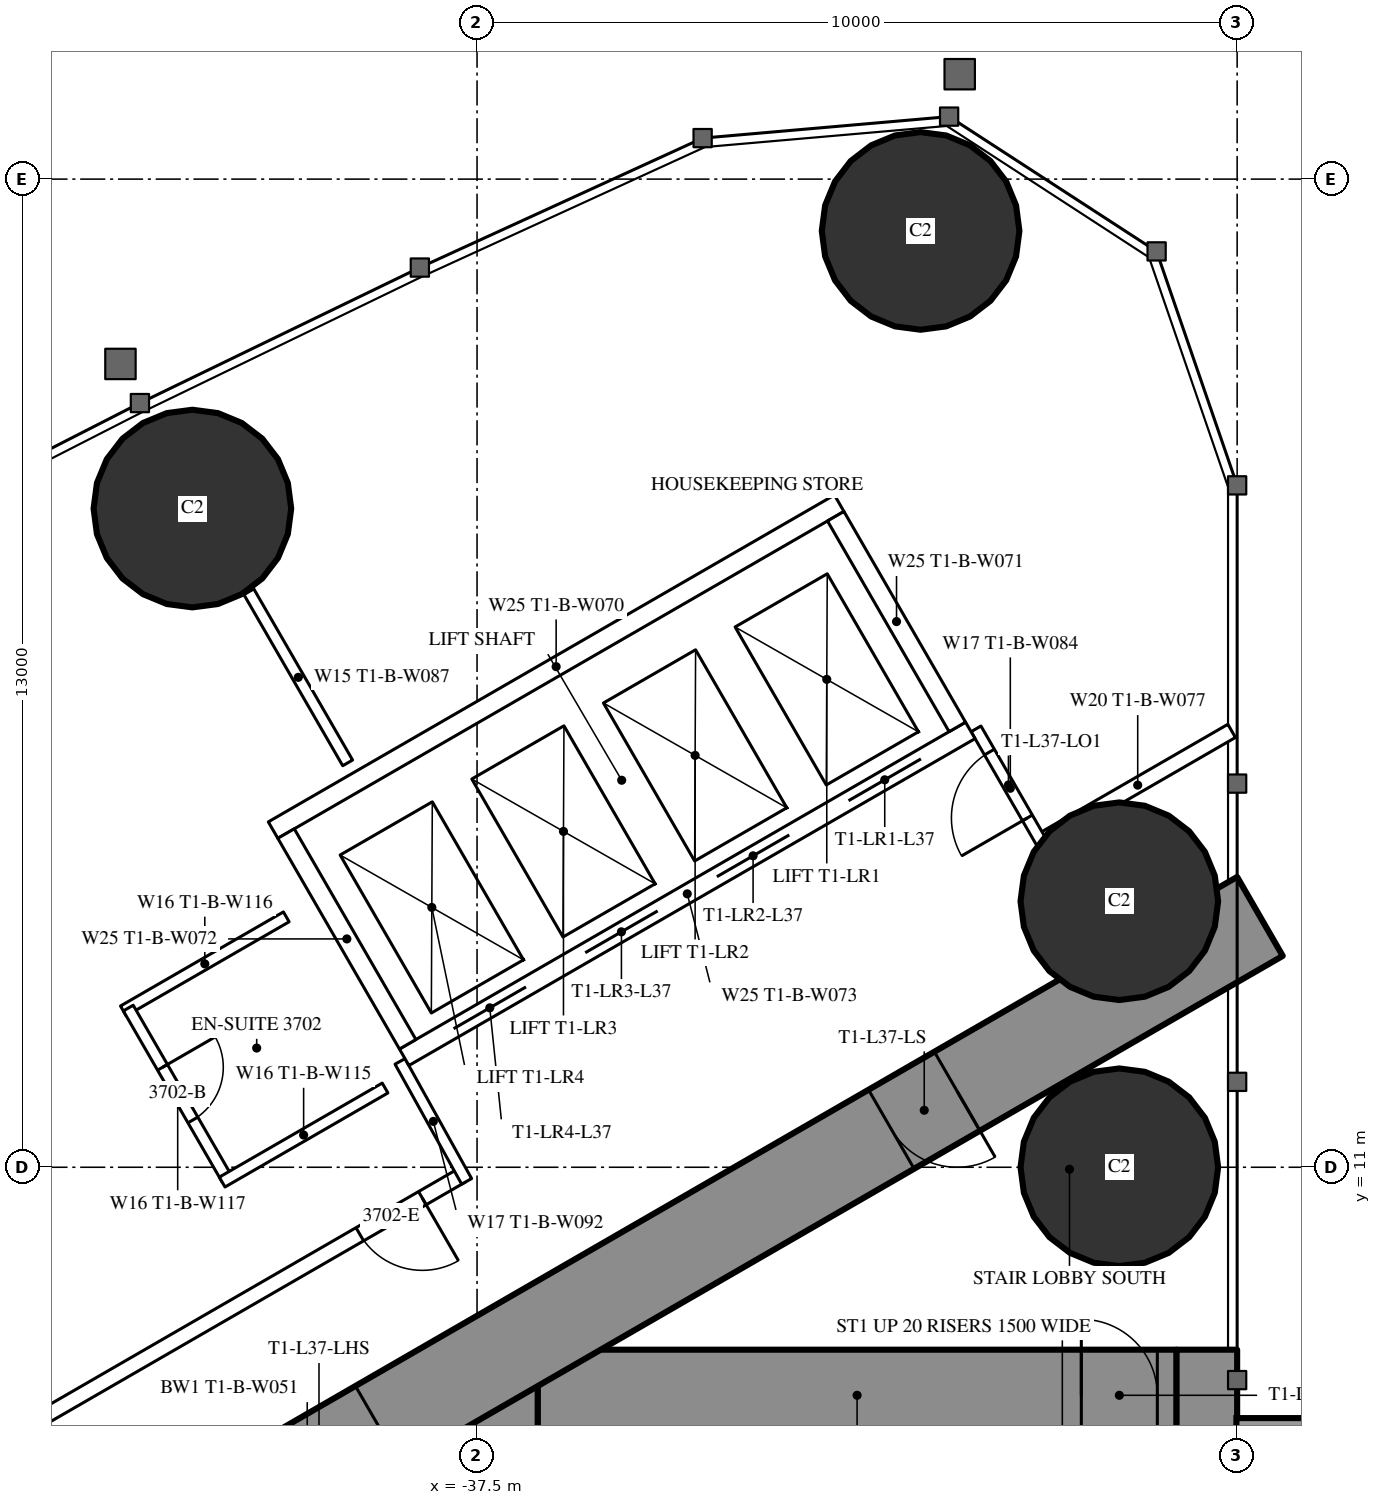
"""IFC4 building model, lengths in metres.
Left out: names, types, materials, properties, quantities, classifications, styles, units other than length and angle.
Written with IfcOpenShell. Run it as: python <this file> out.ifc"""

import sys

from ifc_helpers import new_model, si_unit, direction, frame, frame_2d, origin, origin_2d, place, context, subcontext, project, spatial, rectangle, hollow_circle, extrude, element, fill, save


model = new_model("IFC4")
c1 = context("Model", 3, precision=1e-05, world=origin(), true_north=direction((0.0, 1.0)))
c2 = subcontext(c1, "Body", "Model", "MODEL_VIEW")
j1 = project(units=[si_unit("LENGTHUNIT", "METRE"), si_unit("PLANEANGLEUNIT", "RADIAN")], contexts=[c1])
p1 = place(None, origin())
s1 = spatial("IfcSite", under=j1, at=p1, CompositionType="ELEMENT")
p2 = place(p1, origin())
s2 = spatial("IfcBuilding", under=s1, at=p2, CompositionType="ELEMENT")
p3 = place(p2, frame((0.0, 0.0, 139.6)))
s3 = spatial("IfcBuildingStorey", under=s2, at=p3, CompositionType="ELEMENT", Elevation=139.6)
for number, where, z_axis, x_axis in (
    (1, (-31.665, 23.318, 0.0), (0.0, 0.0, 1.0), (1.0, 0.0, 0.0)),
    (2, (-29.05, 11.0, 0.0), (0.0, 0.0, 1.0), (1.0, 0.0, 0.0)),
    (3, (-29.05, 14.5, 0.0), (0.0, 0.0, 1.0), (1.0, 0.0, 0.0)),
    (4, (-41.245, 19.666, 0.0), (0.0, 0.0, 1.0), (1.0, 0.0, 0.0)),
):
    element("IfcColumn", number, at=place(p3, frame(where, z_axis=z_axis, x_axis=x_axis)), inside=s3, PredefinedType="COLUMN", context=c2, shape_type="SweptSolid", body=[
        extrude(hollow_circle(Radius=1.3, WallThickness=0.1, at=origin_2d()), origin(), (0.0, 0.0, 1.0), 3.5),
    ])
p4 = place(p3, frame((-27.9, 8.6, 0.0), z_axis=(0.0, 0.0, 1.0), x_axis=(0.0, -1.0, 0.0)))
e5 = element("IfcWall", 5, at=p4, inside=s3, PredefinedType="SHEAR", context=c2, shape_type="SweptSolid", body=[
    extrude(rectangle(XDim=17.2, YDim=0.8, at=frame_2d((8.6, 0.0))), origin(), (0.0, 0.0, 1.0), 3.5),
])
p5 = place(p4, frame((2.45, 0.0, 0.6)))
e6 = element("IfcOpeningElement", 6, at=p5, cuts=e5, PredefinedType="OPENING", context=c2, shape_type="SweptSolid", body=[
    extrude(rectangle(XDim=0.6, YDim=2.1, at=frame_2d((0.3, 1.05))), frame((0.0, 0.41, 0.0), z_axis=(0.0, -1.0, 0.0), x_axis=(1.0, 0.0, 0.0)), (0.0, 0.0, 1.0), 0.82),
])
p6 = place(p4, frame((14.15, 0.0, 0.6)))
e7 = element("IfcOpeningElement", 7, at=p6, cuts=e5, PredefinedType="OPENING", context=c2, shape_type="SweptSolid", body=[
    extrude(rectangle(XDim=0.6, YDim=2.1, at=frame_2d((0.3, 1.05))), frame((0.0, 0.41, 0.0), z_axis=(0.0, -1.0, 0.0), x_axis=(1.0, 0.0, 0.0)), (0.0, 0.0, 1.0), 0.82),
])
p7 = place(p3, frame((-37.3, 8.6, 0.0), z_axis=(0.0, 0.0, 1.0), x_axis=(0.0, -1.0, 0.0)))
e8 = element("IfcWall", 8, at=p7, inside=s3, PredefinedType="SHEAR", context=c2, shape_type="SweptSolid", body=[
    extrude(rectangle(XDim=17.2, YDim=1.2, at=frame_2d((8.6, 0.0))), origin(), (0.0, 0.0, 1.0), 3.5),
])
p8 = place(p7, frame((7.7, 0.0, 0.0)))
e9 = element("IfcOpeningElement", 9, at=p8, cuts=e8, PredefinedType="OPENING", context=c2, shape_type="SweptSolid", body=[
    extrude(rectangle(XDim=1.8, YDim=2.2, at=frame_2d((0.9, 1.1))), frame((0.0, 0.61, 0.0), z_axis=(0.0, -1.0, 0.0), x_axis=(1.0, 0.0, 0.0)), (0.0, 0.0, 1.0), 1.22),
])
p9 = place(p3, frame((-28.3, 8.0, 0.0), z_axis=(0.0, 0.0, 1.0), x_axis=(-1.0, 0.0, 0.0)))
e10 = element("IfcWall", 10, at=p9, inside=s3, PredefinedType="SHEAR", context=c2, shape_type="SweptSolid", body=[
    extrude(rectangle(XDim=8.4, YDim=1.2, at=frame_2d((4.2, 0.0))), origin(), (0.0, 0.0, 1.0), 3.5),
])
p10 = place(p9, frame((0.25, 0.0, 0.0)))
e11 = element("IfcOpeningElement", 11, at=p10, cuts=e10, PredefinedType="OPENING", context=c2, shape_type="SweptSolid", body=[
    extrude(rectangle(XDim=1.0, YDim=2.2, at=frame_2d((0.5, 1.1))), frame((0.0, 0.61, 0.0), z_axis=(0.0, -1.0, 0.0), x_axis=(1.0, 0.0, 0.0)), (0.0, 0.0, 1.0), 1.22),
])
p11 = place(p3, frame((-27.2, 14.3, 0.0), z_axis=(0.0, 0.0, 1.0), x_axis=(-0.866026593062, -0.499997940104, 0.0)))
e12 = element("IfcWall", 12, at=p11, inside=s3, PredefinedType="SHEAR", context=c2, shape_type="SweptSolid", body=[
    extrude(rectangle(XDim=28.946, YDim=1.2, at=frame_2d((14.473, 0.0))), origin(), (0.0, 0.0, 1.0), 3.5),
])
p12 = place(p11, frame((4.6, 0.0, 0.0)))
e13 = element("IfcOpeningElement", 13, at=p12, cuts=e12, PredefinedType="OPENING", context=c2, shape_type="SweptSolid", body=[
    extrude(rectangle(XDim=1.0, YDim=2.2, at=frame_2d((0.5, 1.1))), frame((0.0, 0.61, 0.0), z_axis=(0.0, -1.0, 0.0), x_axis=(1.0, 0.0, 0.0)), (0.0, 0.0, 1.0), 1.22),
])
p13 = place(p11, frame((13.395, 0.0, 0.0)))
e14 = element("IfcOpeningElement", 14, at=p13, cuts=e12, PredefinedType="OPENING", context=c2, shape_type="SweptSolid", body=[
    extrude(rectangle(XDim=1.8, YDim=2.2, at=frame_2d((0.9, 1.1))), frame((0.0, 0.61, 0.0), z_axis=(0.0, -1.0, 0.0), x_axis=(1.0, 0.0, 0.0)), (0.0, 0.0, 1.0), 1.22),
])
p14 = place(p3, frame((-39.202, 16.32, 0.0), z_axis=(0.0, 0.0, 1.0), x_axis=(-0.499947391036, 0.866055775454, 0.0)))
e15 = element("IfcWall", 15, at=p14, inside=s3, PredefinedType="PARTITIONING", context=c2, shape_type="SweptSolid", body=[
    extrude(rectangle(XDim=2.599, YDim=0.15, at=frame_2d((1.3, 0.0))), origin(), (0.0, 0.0, 1.0), 3.25),
])
p15 = place(p3, frame((-27.572, 16.741, 0.0), z_axis=(0.0, 0.0, 1.0), x_axis=(-0.866034618596, -0.499984039138, 0.0)))
e16 = element("IfcWall", 16, at=p15, inside=s3, PredefinedType="PARTITIONING", context=c2, shape_type="SweptSolid", body=[
    extrude(rectangle(XDim=2.854, YDim=0.2, at=frame_2d((1.427, 0.0))), origin(), (0.0, 0.0, 1.0), 3.25),
])
p16 = place(p3, frame((-37.7, 10.894, 0.0), z_axis=(0.0, 0.0, 1.0), x_axis=(-0.866027905338, -0.499995667157, 0.0)))
e17 = element("IfcWall", 17, at=p16, inside=s3, PredefinedType="PARTITIONING", context=c2, shape_type="SweptSolid", body=[
    extrude(rectangle(XDim=21.787, YDim=0.2, at=frame_2d((10.894, 0.0))), origin(), (0.0, 0.0, 1.0), 3.25),
])
p17 = place(p16, frame((17.711, 0.0, 0.0)))
e18 = element("IfcOpeningElement", 18, at=p17, cuts=e17, PredefinedType="OPENING", context=c2, shape_type="SweptSolid", body=[
    extrude(rectangle(XDim=0.95, YDim=2.2, at=frame_2d((0.475, 1.1))), frame((0.0, 0.11, 0.0), z_axis=(0.0, -1.0, 0.0), x_axis=(1.0, 0.0, 0.0)), (0.0, 0.0, 1.0), 0.22),
])
p18 = place(p16, frame((19.399, 0.0, 0.0)))
e19 = element("IfcOpeningElement", 19, at=p18, cuts=e17, PredefinedType="OPENING", context=c2, shape_type="SweptSolid", body=[
    extrude(rectangle(XDim=1.8, YDim=2.2, at=frame_2d((0.9, 1.1))), frame((0.0, 0.11, 0.0), z_axis=(0.0, -1.0, 0.0), x_axis=(1.0, 0.0, 0.0)), (0.0, 0.0, 1.0), 0.22),
])
p19 = place(p16, frame((0.6, 0.0, 0.0)))
e20 = element("IfcOpeningElement", 20, at=p19, cuts=e17, PredefinedType="OPENING", context=c2, shape_type="SweptSolid", body=[
    extrude(rectangle(XDim=0.95, YDim=2.2, at=frame_2d((0.475, 1.1))), frame((0.0, 0.11, 0.0), z_axis=(0.0, -1.0, 0.0), x_axis=(1.0, 0.0, 0.0)), (0.0, 0.0, 1.0), 0.22),
])
p20 = place(p3, frame((-38.513, 12.392, 0.0), z_axis=(0.0, 0.0, 1.0), x_axis=(0.485585508183, -0.874189175317, 0.0)))
e21 = element("IfcWall", 21, at=p20, inside=s3, PredefinedType="PARTITIONING", context=c2, shape_type="SweptSolid", body=[
    extrude(rectangle(XDim=1.805, YDim=0.15, at=frame_2d((0.902, 0.0))), origin(), (0.0, 0.0, 1.0), 3.25),
])
p21 = place(p3, frame((-30.033, 15.205, 0.0), z_axis=(0.0, 0.0, 1.0), x_axis=(-0.499980071345, 0.866036909293, 0.0)))
e22 = element("IfcWall", 22, at=p21, inside=s3, PredefinedType="PARTITIONING", context=c2, shape_type="SweptSolid", body=[
    extrude(rectangle(XDim=1.805, YDim=0.15, at=frame_2d((0.902, 0.0))), origin(), (0.0, 0.0, 1.0), 3.25),
])
p22 = place(p21, frame((0.452, 0.0, 0.0)))
e23 = element("IfcOpeningElement", 23, at=p22, cuts=e22, PredefinedType="OPENING", context=c2, shape_type="SweptSolid", body=[
    extrude(rectangle(XDim=1.0, YDim=2.2, at=frame_2d((0.5, 1.1))), frame((0.0, 0.085, 0.0), z_axis=(0.0, -1.0, 0.0), x_axis=(1.0, 0.0, 0.0)), (0.0, 0.0, 1.0), 0.17),
])
p23 = place(p3, frame((-40.01, 14.294, 0.0), z_axis=(0.0, 0.0, 1.0), x_axis=(-0.866031185235, -0.4999899861, 0.0)))
e24 = element("IfcWall", 24, at=p23, inside=s3, PredefinedType="PARTITIONING", context=c2, shape_type="SweptSolid", body=[
    extrude(rectangle(XDim=2.475, YDim=0.15, at=frame_2d((1.238, 0.0))), origin(), (0.0, 0.0, 1.0), 3.25),
])
p24 = place(p3, frame((-40.788, 10.843, 0.0), z_axis=(0.0, 0.0, 1.0), x_axis=(-0.500006934395, 0.866021400173, 0.0)))
e25 = element("IfcWall", 25, at=p24, inside=s3, PredefinedType="PARTITIONING", context=c2, shape_type="SweptSolid", body=[
    extrude(rectangle(XDim=2.6, YDim=0.15, at=frame_2d((1.3, 0.0))), origin(), (0.0, 0.0, 1.0), 3.25),
])
p25 = place(p24, frame((0.9, 0.0, 0.0)))
e26 = element("IfcOpeningElement", 26, at=p25, cuts=e25, PredefinedType="OPENING", context=c2, shape_type="SweptSolid", body=[
    extrude(rectangle(XDim=0.8, YDim=2.2, at=frame_2d((0.4, 1.1))), frame((0.0, 0.085, 0.0), z_axis=(0.0, -1.0, 0.0), x_axis=(1.0, 0.0, 0.0)), (0.0, 0.0, 1.0), 0.17),
])
p26 = place(p3, frame((-38.71, 12.042, 0.0), z_axis=(0.0, 0.0, 1.0), x_axis=(-0.86604923931, -0.499958713387, 0.0)))
e27 = element("IfcWall", 27, at=p26, inside=s3, PredefinedType="PARTITIONING", context=c2, shape_type="SweptSolid", body=[
    extrude(rectangle(XDim=2.475, YDim=0.15, at=frame_2d((1.237, 0.0))), origin(), (0.0, 0.0, 1.0), 3.25),
])
p27 = place(p3, frame((-31.01, 16.747, 0.0), z_axis=(0.0, 0.0, 1.0), x_axis=(-0.866028165386, -0.499995216735, 0.0)))
e28 = element("IfcWall", 28, at=p27, inside=s3, PredefinedType="PARTITIONING", context=c2, shape_type="SweptSolid", body=[
    extrude(rectangle(XDim=8.6, YDim=0.25, at=frame_2d((4.3, 0.0))), origin(), (0.0, 0.0, 1.0), 3.25),
])
p28 = place(p27, frame((0.75, 0.0, 0.0)))
e29 = element("IfcOpeningElement", 29, at=p28, cuts=e28, PredefinedType="OPENING", context=c2, shape_type="SweptSolid", body=[
    extrude(rectangle(XDim=1.1, YDim=2.2, at=frame_2d((0.55, 1.1))), frame((0.0, 0.135, 0.0), z_axis=(0.0, -1.0, 0.0), x_axis=(1.0, 0.0, 0.0)), (0.0, 0.0, 1.0), 0.27),
])
p29 = place(p27, frame((2.75, 0.0, 0.0)))
e30 = element("IfcOpeningElement", 30, at=p29, cuts=e28, PredefinedType="OPENING", context=c2, shape_type="SweptSolid", body=[
    extrude(rectangle(XDim=1.1, YDim=2.2, at=frame_2d((0.55, 1.1))), frame((0.0, 0.135, 0.0), z_axis=(0.0, -1.0, 0.0), x_axis=(1.0, 0.0, 0.0)), (0.0, 0.0, 1.0), 0.27),
])
p30 = place(p27, frame((4.75, 0.0, 0.0)))
e31 = element("IfcOpeningElement", 31, at=p30, cuts=e28, PredefinedType="OPENING", context=c2, shape_type="SweptSolid", body=[
    extrude(rectangle(XDim=1.1, YDim=2.2, at=frame_2d((0.55, 1.1))), frame((0.0, 0.135, 0.0), z_axis=(0.0, -1.0, 0.0), x_axis=(1.0, 0.0, 0.0)), (0.0, 0.0, 1.0), 0.27),
])
p31 = place(p27, frame((6.75, 0.0, 0.0)))
e32 = element("IfcOpeningElement", 32, at=p31, cuts=e28, PredefinedType="OPENING", context=c2, shape_type="SweptSolid", body=[
    extrude(rectangle(XDim=1.1, YDim=2.2, at=frame_2d((0.55, 1.1))), frame((0.0, 0.135, 0.0), z_axis=(0.0, -1.0, 0.0), x_axis=(1.0, 0.0, 0.0)), (0.0, 0.0, 1.0), 0.27),
])
p32 = place(p3, frame((-32.736, 19.736, 0.0), z_axis=(0.0, 0.0, 1.0), x_axis=(-0.866028165386, -0.499995216735, 0.0)))
e33 = element("IfcWall", 33, at=p32, inside=s3, PredefinedType="PARTITIONING", context=c2, shape_type="SweptSolid", body=[
    extrude(rectangle(XDim=8.6, YDim=0.25, at=frame_2d((4.3, 0.0))), origin(), (0.0, 0.0, 1.0), 3.25),
])
p33 = place(p3, frame((-31.181, 16.793, 0.0), z_axis=(0.0, 0.0, 1.0), x_axis=(-0.499929347863, 0.866066190972, 0.0)))
e34 = element("IfcWall", 34, at=p33, inside=s3, PredefinedType="PARTITIONING", context=c2, shape_type="SweptSolid", body=[
    extrude(rectangle(XDim=3.201, YDim=0.25, at=frame_2d((1.6, 0.0))), origin(), (0.0, 0.0, 1.0), 3.25),
])
p34 = place(p3, frame((-38.413, 12.618, 0.0), z_axis=(0.0, 0.0, 1.0), x_axis=(-0.499872130319, 0.866099216793, 0.0)))
e35 = element("IfcWall", 35, at=p34, inside=s3, PredefinedType="PARTITIONING", context=c2, shape_type="SweptSolid", body=[
    extrude(rectangle(XDim=3.2, YDim=0.25, at=frame_2d((1.6, 0.0))), origin(), (0.0, 0.0, 1.0), 3.25),
])
p35 = place(p25, origin())
e36 = element("IfcDoor", 36, at=p35, inside=s3, OperationType="SINGLE_SWING_RIGHT", PredefinedType="DOOR", context=c2, shape_type="SweptSolid", body=[
    extrude(rectangle(XDim=0.8, YDim=2.2, at=frame_2d((0.4, 1.1))), frame((0.0, 0.025, 0.0), z_axis=(0.0, -1.0, 0.0), x_axis=(1.0, 0.0, 0.0)), (0.0, 0.0, 1.0), 0.05),
])
fill(e26, e36)
p36 = place(p19, origin())
e37 = element("IfcDoor", 37, at=p36, inside=s3, OperationType="SINGLE_SWING_LEFT", PredefinedType="DOOR", context=c2, shape_type="SweptSolid", body=[
    extrude(rectangle(XDim=0.95, YDim=2.2, at=frame_2d((0.475, 1.1))), frame((0.0, 0.025, 0.0), z_axis=(0.0, -1.0, 0.0), x_axis=(1.0, 0.0, 0.0)), (0.0, 0.0, 1.0), 0.05),
])
fill(e20, e37)
p37 = place(p22, origin())
e38 = element("IfcDoor", 38, at=p37, inside=s3, OperationType="SINGLE_SWING_LEFT", PredefinedType="DOOR", context=c2, shape_type="SweptSolid", body=[
    extrude(rectangle(XDim=1.0, YDim=2.2, at=frame_2d((0.5, 1.1))), frame((0.0, 0.025, 0.0), z_axis=(0.0, -1.0, 0.0), x_axis=(1.0, 0.0, 0.0)), (0.0, 0.0, 1.0), 0.05),
])
fill(e23, e38)
p38 = place(p12, origin())
e39 = element("IfcDoor", 39, at=p38, inside=s3, OperationType="SINGLE_SWING_LEFT", PredefinedType="DOOR", context=c2, shape_type="SweptSolid", body=[
    extrude(rectangle(XDim=1.0, YDim=2.2, at=frame_2d((0.5, 1.1))), frame((0.0, 0.025, 0.0), z_axis=(0.0, -1.0, 0.0), x_axis=(1.0, 0.0, 0.0)), (0.0, 0.0, 1.0), 0.05),
])
fill(e13, e39)
p39 = place(p13, origin())
e40 = element("IfcDoor", 40, at=p39, inside=s3, OperationType="DOUBLE_DOOR_SINGLE_SWING", PredefinedType="DOOR", context=c2, shape_type="SweptSolid", body=[
    extrude(rectangle(XDim=1.8, YDim=2.2, at=frame_2d((0.9, 1.1))), frame((0.0, 0.025, 0.0), z_axis=(0.0, -1.0, 0.0), x_axis=(1.0, 0.0, 0.0)), (0.0, 0.0, 1.0), 0.05),
])
fill(e14, e40)
p40 = place(p10, origin())
e41 = element("IfcDoor", 41, at=p40, inside=s3, OperationType="SINGLE_SWING_RIGHT", PredefinedType="DOOR", context=c2, shape_type="SweptSolid", body=[
    extrude(rectangle(XDim=1.0, YDim=2.2, at=frame_2d((0.5, 1.1))), frame((0.0, 0.025, 0.0), z_axis=(0.0, -1.0, 0.0), x_axis=(1.0, 0.0, 0.0)), (0.0, 0.0, 1.0), 0.05),
])
fill(e11, e41)
p41 = place(p28, origin())
e42 = element("IfcDoor", 42, at=p41, inside=s3, OperationType="DOUBLE_DOOR_SLIDING", PredefinedType="USERDEFINED", context=c2, shape_type="SweptSolid", body=[
    extrude(rectangle(XDim=1.1, YDim=2.2, at=frame_2d((0.55, 1.1))), frame((0.0, 0.025, 0.0), z_axis=(0.0, -1.0, 0.0), x_axis=(1.0, 0.0, 0.0)), (0.0, 0.0, 1.0), 0.05),
])
fill(e29, e42)
p42 = place(p29, origin())
e43 = element("IfcDoor", 43, at=p42, inside=s3, OperationType="DOUBLE_DOOR_SLIDING", PredefinedType="USERDEFINED", context=c2, shape_type="SweptSolid", body=[
    extrude(rectangle(XDim=1.1, YDim=2.2, at=frame_2d((0.55, 1.1))), frame((0.0, 0.025, 0.0), z_axis=(0.0, -1.0, 0.0), x_axis=(1.0, 0.0, 0.0)), (0.0, 0.0, 1.0), 0.05),
])
fill(e30, e43)
p43 = place(p30, origin())
e44 = element("IfcDoor", 44, at=p43, inside=s3, OperationType="DOUBLE_DOOR_SLIDING", PredefinedType="USERDEFINED", context=c2, shape_type="SweptSolid", body=[
    extrude(rectangle(XDim=1.1, YDim=2.2, at=frame_2d((0.55, 1.1))), frame((0.0, 0.025, 0.0), z_axis=(0.0, -1.0, 0.0), x_axis=(1.0, 0.0, 0.0)), (0.0, 0.0, 1.0), 0.05),
])
fill(e31, e44)
p44 = place(p31, origin())
e45 = element("IfcDoor", 45, at=p44, inside=s3, OperationType="DOUBLE_DOOR_SLIDING", PredefinedType="USERDEFINED", context=c2, shape_type="SweptSolid", body=[
    extrude(rectangle(XDim=1.1, YDim=2.2, at=frame_2d((0.55, 1.1))), frame((0.0, 0.025, 0.0), z_axis=(0.0, -1.0, 0.0), x_axis=(1.0, 0.0, 0.0)), (0.0, 0.0, 1.0), 0.05),
])
fill(e32, e45)
save(model, sys.argv[1])
